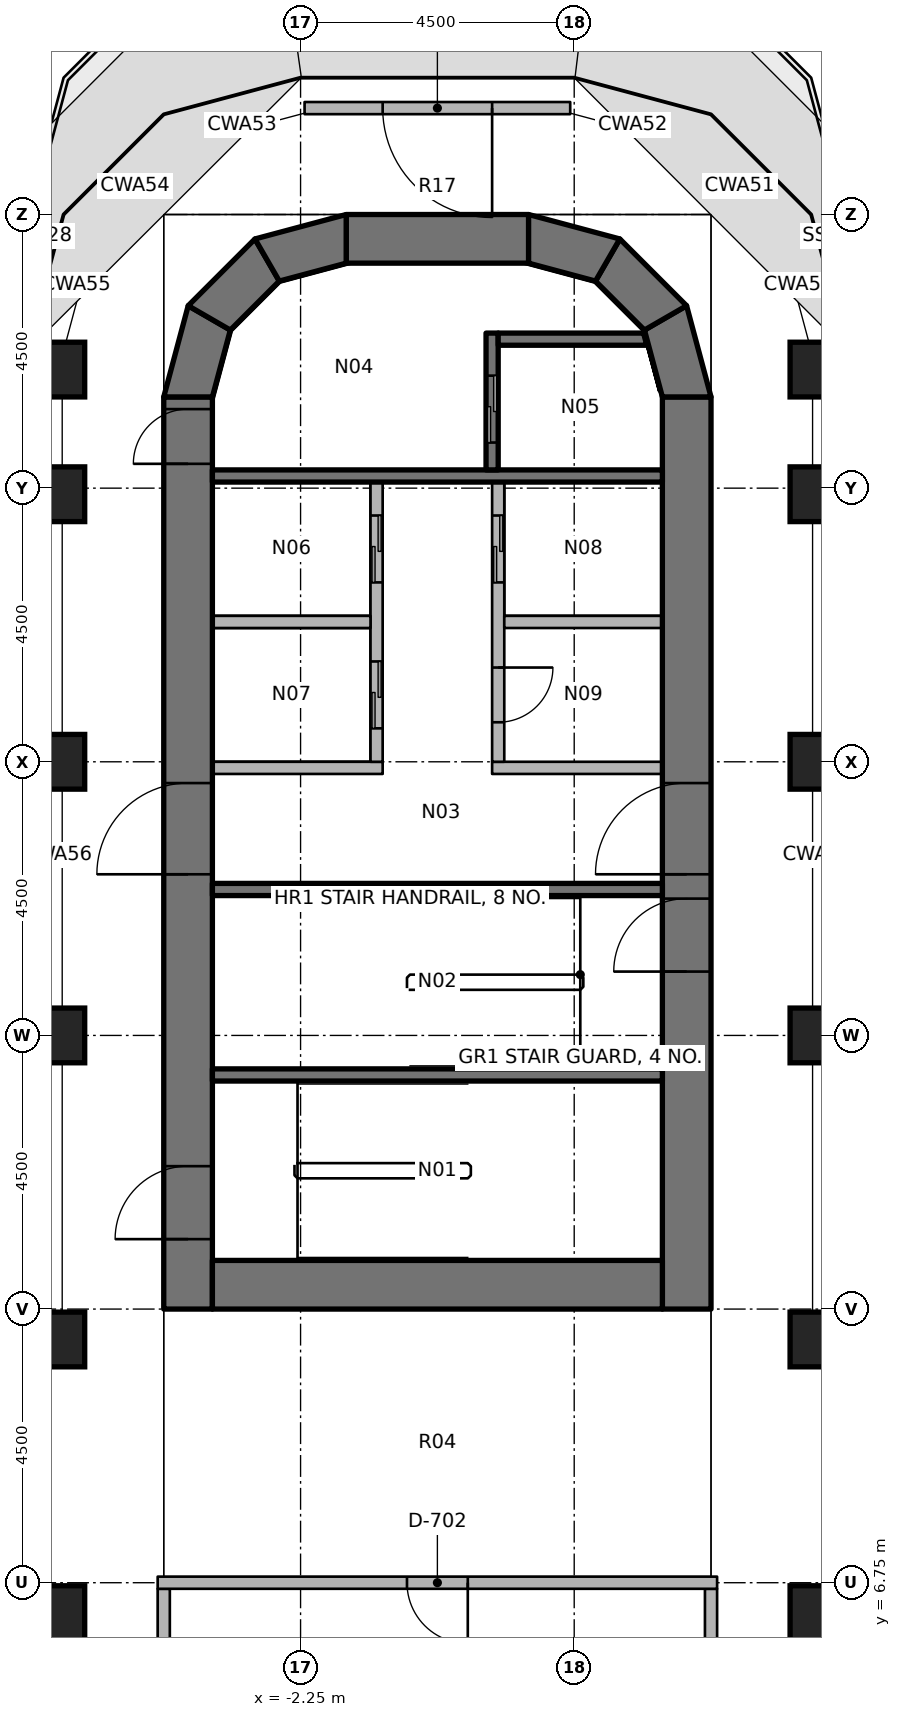
"""IFC4 building model, lengths in metres.
Left out: names, types, materials, properties, quantities, classifications, styles, units other than length and angle.
Written with IfcOpenShell. Run it as: python <this file> out.ifc"""

import sys

from ifc_helpers import new_model, si_unit, direction, frame, frame_2d, origin, origin_2d, place, context, subcontext, project, spatial, polyline, rectangle, outline, extrude, element, fill, save


model = new_model("IFC4")
c1 = context("Model", 3, precision=1e-05, world=origin(), true_north=direction((0.0, 1.0)))
c2 = subcontext(c1, "Body", "Model", "MODEL_VIEW")
j1 = project(units=[si_unit("LENGTHUNIT", "METRE"), si_unit("PLANEANGLEUNIT", "RADIAN")], contexts=[c1])
p1 = place(None, origin())
s1 = spatial("IfcSite", under=j1, at=p1, CompositionType="ELEMENT")
p2 = place(p1, origin())
s2 = spatial("IfcBuilding", under=s1, at=p2, CompositionType="ELEMENT")
p3 = place(p2, frame((0.0, 0.0, 94.2)))
s3 = spatial("IfcBuildingStorey", under=s2, at=p3, CompositionType="ELEMENT", Elevation=94.2)
for number, where, z_axis, x_axis in (
    (1, (-6.25, 6.25, 0.0), (0.0, 0.0, 1.0), (1.0, 0.0, 0.0)),
    (2, (-6.25, 10.75, 0.0), (0.0, 0.0, 1.0), (1.0, 0.0, 0.0)),
    (3, (-6.25, 15.75, 0.0), (0.0, 0.0, 1.0), (1.0, 0.0, 0.0)),
    (4, (-6.25, 20.25, 0.0), (0.0, 0.0, 1.0), (1.0, 0.0, 0.0)),
    (5, (-6.25, 24.65, 0.0), (0.0, 0.0, 1.0), (1.0, 0.0, 0.0)),
    (6, (-6.25, 26.7, 0.0), (0.0, 0.0, 1.0), (1.0, 0.0, 0.0)),
    (7, (6.25, 6.25, 0.0), (0.0, 0.0, 1.0), (1.0, 0.0, 0.0)),
    (8, (6.25, 10.75, 0.0), (0.0, 0.0, 1.0), (1.0, 0.0, 0.0)),
    (9, (6.25, 15.75, 0.0), (0.0, 0.0, 1.0), (1.0, 0.0, 0.0)),
    (10, (6.25, 20.25, 0.0), (0.0, 0.0, 1.0), (1.0, 0.0, 0.0)),
    (11, (6.25, 24.65, 0.0), (0.0, 0.0, 1.0), (1.0, 0.0, 0.0)),
    (12, (6.25, 26.7, 0.0), (0.0, 0.0, 1.0), (1.0, 0.0, 0.0)),
):
    element("IfcColumn", number, at=place(p3, frame(where, z_axis=z_axis, x_axis=x_axis)), inside=s3, PredefinedType="COLUMN", context=c2, shape_type="SweptSolid", body=[
        extrude(rectangle(XDim=0.9, YDim=0.9, at=origin_2d()), origin(), (0.0, 0.0, 1.0), 3.65),
    ])
p4 = place(p3, frame((-4.1, 11.25, 0.0), z_axis=(0.0, 0.0, 1.0), x_axis=(0.0, 1.0, 0.0)))
e13 = element("IfcWall", 13, at=p4, inside=s3, PredefinedType="SHEAR", context=c2, shape_type="SweptSolid", body=[
    extrude(rectangle(XDim=15.0, YDim=0.8, at=frame_2d((7.5, 0.0))), origin(), (0.0, 0.0, 1.0), 3.8),
])
p5 = place(p4, frame((7.15, 0.0, 0.0)))
e14 = element("IfcOpeningElement", 14, at=p5, cuts=e13, PredefinedType="OPENING", context=c2, shape_type="SweptSolid", body=[
    extrude(rectangle(XDim=1.5, YDim=2.3, at=frame_2d((0.75, 1.15))), frame((0.0, 0.41, 0.0), z_axis=(0.0, -1.0, 0.0), x_axis=(1.0, 0.0, 0.0)), (0.0, 0.0, 1.0), 0.82),
])
p6 = place(p4, frame((13.9, 0.0, 0.0)))
e15 = element("IfcOpeningElement", 15, at=p6, cuts=e13, PredefinedType="OPENING", context=c2, shape_type="SweptSolid", body=[
    extrude(rectangle(XDim=0.9, YDim=2.1, at=frame_2d((0.45, 1.05))), frame((0.0, 0.41, 0.0), z_axis=(0.0, -1.0, 0.0), x_axis=(1.0, 0.0, 0.0)), (0.0, 0.0, 1.0), 0.82),
])
p7 = place(p4, frame((1.15, 0.0, 0.0)))
e16 = element("IfcOpeningElement", 16, at=p7, cuts=e13, PredefinedType="OPENING", context=c2, shape_type="SweptSolid", body=[
    extrude(rectangle(XDim=1.2, YDim=2.1, at=frame_2d((0.6, 1.05))), frame((0.0, 0.41, 0.0), z_axis=(0.0, -1.0, 0.0), x_axis=(1.0, 0.0, 0.0)), (0.0, 0.0, 1.0), 0.82),
])
p8 = place(p3, frame((4.1, 11.25, 0.0), z_axis=(0.0, 0.0, 1.0), x_axis=(0.0, 1.0, 0.0)))
e17 = element("IfcWall", 17, at=p8, inside=s3, PredefinedType="SHEAR", context=c2, shape_type="SweptSolid", body=[
    extrude(rectangle(XDim=15.0, YDim=0.8, at=frame_2d((7.5, 0.0))), origin(), (0.0, 0.0, 1.0), 3.8),
])
p9 = place(p8, frame((7.15, 0.0, 0.0)))
e18 = element("IfcOpeningElement", 18, at=p9, cuts=e17, PredefinedType="OPENING", context=c2, shape_type="SweptSolid", body=[
    extrude(rectangle(XDim=1.5, YDim=2.3, at=frame_2d((0.75, 1.15))), frame((0.0, 0.41, 0.0), z_axis=(0.0, -1.0, 0.0), x_axis=(1.0, 0.0, 0.0)), (0.0, 0.0, 1.0), 0.82),
])
p10 = place(p8, frame((5.55, 0.0, 0.0)))
e19 = element("IfcOpeningElement", 19, at=p10, cuts=e17, PredefinedType="OPENING", context=c2, shape_type="SweptSolid", body=[
    extrude(rectangle(XDim=1.2, YDim=2.1, at=frame_2d((0.6, 1.05))), frame((0.0, 0.41, 0.0), z_axis=(0.0, -1.0, 0.0), x_axis=(1.0, 0.0, 0.0)), (0.0, 0.0, 1.0), 0.82),
])
p11 = place(p3, frame((-3.7, 11.65, 0.0), z_axis=(0.0, 0.0, 1.0), x_axis=(1.0, 0.0, 0.0)))
e20 = element("IfcWall", 20, at=p11, inside=s3, PredefinedType="SHEAR", context=c2, shape_type="SweptSolid", body=[
    extrude(rectangle(XDim=7.4, YDim=0.8, at=frame_2d((3.7, 0.0))), origin(), (0.0, 0.0, 1.0), 3.8),
])
p12 = place(p3, frame((-1.5, 28.85, 0.0), z_axis=(0.0, 0.0, 1.0), x_axis=(1.0, 0.0, 0.0)))
e21 = element("IfcWall", 21, at=p12, inside=s3, PredefinedType="SHEAR", context=c2, shape_type="SweptSolid", body=[
    extrude(rectangle(XDim=3.0, YDim=0.8, at=frame_2d((1.5, 0.0))), origin(), (0.0, 0.0, 1.0), 3.8),
])
p13 = place(p3, origin())
e22 = element("IfcWall", 22, at=p13, inside=s3, PredefinedType="SHEAR", context=c2, shape_type="SweptSolid", body=[
    extrude(outline(polyline([(-4.5, 26.25), (-4.098, 27.75), (-3.405, 27.35), (-3.7, 26.25), (-4.5, 26.25)])), origin(), (0.0, 0.0, 1.0), 3.8),
])
p14 = place(p3, origin())
e23 = element("IfcWall", 23, at=p14, inside=s3, PredefinedType="SHEAR", context=c2, shape_type="SweptSolid", body=[
    extrude(outline(polyline([(-4.098, 27.75), (-3.0, 28.848), (-2.6, 28.155), (-3.405, 27.35), (-4.098, 27.75)])), origin(), (0.0, 0.0, 1.0), 3.8),
])
p15 = place(p3, origin())
e24 = element("IfcWall", 24, at=p15, inside=s3, PredefinedType="SHEAR", context=c2, shape_type="SweptSolid", body=[
    extrude(outline(polyline([(-3.0, 28.848), (-1.5, 29.25), (-1.5, 28.45), (-2.6, 28.155), (-3.0, 28.848)])), origin(), (0.0, 0.0, 1.0), 3.8),
])
p16 = place(p3, origin())
e25 = element("IfcWall", 25, at=p16, inside=s3, PredefinedType="SHEAR", context=c2, shape_type="SweptSolid", body=[
    extrude(outline(polyline([(4.5, 26.25), (4.098, 27.75), (3.405, 27.35), (3.7, 26.25), (4.5, 26.25)])), origin(), (0.0, 0.0, 1.0), 3.8),
])
p17 = place(p3, origin())
e26 = element("IfcWall", 26, at=p17, inside=s3, PredefinedType="SHEAR", context=c2, shape_type="SweptSolid", body=[
    extrude(outline(polyline([(4.098, 27.75), (3.0, 28.848), (2.6, 28.155), (3.405, 27.35), (4.098, 27.75)])), origin(), (0.0, 0.0, 1.0), 3.8),
])
p18 = place(p3, origin())
e27 = element("IfcWall", 27, at=p18, inside=s3, PredefinedType="SHEAR", context=c2, shape_type="SweptSolid", body=[
    extrude(outline(polyline([(3.0, 28.848), (1.5, 29.25), (1.5, 28.45), (2.6, 28.155), (3.0, 28.848)])), origin(), (0.0, 0.0, 1.0), 3.8),
])
p19 = place(p3, frame((2.184, 31.0, 0.0), z_axis=(0.0, 0.0, 1.0), x_axis=(-1.0, 0.0, 0.0)))
e28 = element("IfcWall", 28, at=p19, inside=s3, PredefinedType="SOLIDWALL", context=c2, shape_type="SweptSolid", body=[
    extrude(rectangle(XDim=4.368, YDim=0.2, at=frame_2d((2.184, 0.0))), origin(), (0.0, 0.0, 1.0), 2.75),
])
p20 = place(p19, frame((1.284, 0.0, 0.0)))
e29 = element("IfcOpeningElement", 29, at=p20, cuts=e28, PredefinedType="OPENING", context=c2, shape_type="SweptSolid", body=[
    extrude(rectangle(XDim=1.8, YDim=2.4, at=frame_2d((0.9, 1.2))), frame((0.0, 0.11, 0.0), z_axis=(0.0, -1.0, 0.0), x_axis=(1.0, 0.0, 0.0)), (0.0, 0.0, 1.0), 0.22),
])
p21 = place(p3, frame((-3.7, 24.95, 0.0), z_axis=(0.0, 0.0, 1.0), x_axis=(1.0, 0.0, 0.0)))
e30 = element("IfcWall", 30, at=p21, inside=s3, PredefinedType="SHEAR", context=c2, shape_type="SweptSolid", body=[
    extrude(rectangle(XDim=7.4, YDim=0.2, at=frame_2d((3.7, 0.0))), origin(), (0.0, 0.0, 1.0), 3.65),
])
p22 = place(p3, frame((0.9, 27.3, 0.0), z_axis=(0.0, 0.0, 1.0), x_axis=(0.0, -1.0, 0.0)))
e31 = element("IfcWall", 31, at=p22, inside=s3, PredefinedType="SHEAR", context=c2, shape_type="SweptSolid", body=[
    extrude(rectangle(XDim=2.25, YDim=0.2, at=frame_2d((1.125, 0.0))), origin(), (0.0, 0.0, 1.0), 3.65),
])
p23 = place(p22, frame((0.7, 0.0, 0.0)))
e32 = element("IfcOpeningElement", 32, at=p23, cuts=e31, PredefinedType="OPENING", context=c2, shape_type="SweptSolid", body=[
    extrude(rectangle(XDim=1.1, YDim=2.3, at=frame_2d((0.55, 1.15))), frame((0.0, 0.11, 0.0), z_axis=(0.0, -1.0, 0.0), x_axis=(1.0, 0.0, 0.0)), (0.0, 0.0, 1.0), 0.22),
])
p24 = place(p3, origin())
e33 = element("IfcWall", 33, at=p24, inside=s3, PredefinedType="SHEAR", context=c2, shape_type="SweptSolid", body=[
    extrude(outline(polyline([(1.0, 27.1), (3.444, 27.1), (3.39, 27.3), (1.0, 27.3), (1.0, 27.1)])), origin(), (0.0, 0.0, 1.0), 3.65),
])
for number, where, z_axis, x_axis in (
    (34, (-3.7, 18.15, 0.0), (0.0, 0.0, 1.0), (1.0, 0.0, 0.0)),
    (35, (-3.7, 15.1, 0.0), (0.0, 0.0, 1.0), (1.0, 0.0, 0.0)),
):
    element("IfcWall", number, at=place(p3, frame(where, z_axis=z_axis, x_axis=x_axis)), inside=s3, PredefinedType="SHEAR", context=c2, shape_type="SweptSolid", body=[
        extrude(rectangle(XDim=7.4, YDim=0.2, at=frame_2d((3.7, 0.0))), origin(), (0.0, 0.0, 1.0), 3.65),
    ])
p25 = place(p3, frame((-3.7, 20.15, 0.0), z_axis=(0.0, 0.0, 1.0), x_axis=(1.0, 0.0, 0.0)))
e36 = element("IfcWall", 36, at=p25, inside=s3, PredefinedType="PARTITIONING", context=c2, shape_type="SweptSolid", body=[
    extrude(rectangle(XDim=2.8, YDim=0.2, at=frame_2d((1.4, 0.0))), origin(), (0.0, 0.0, 1.0), 3.65),
])
p26 = place(p3, frame((-1.0, 24.85, 0.0), z_axis=(0.0, 0.0, 1.0), x_axis=(0.0, -1.0, 0.0)))
e37 = element("IfcWall", 37, at=p26, inside=s3, PredefinedType="PARTITIONING", context=c2, shape_type="SweptSolid", body=[
    extrude(rectangle(XDim=4.6, YDim=0.2, at=frame_2d((2.3, 0.0))), origin(), (0.0, 0.0, 1.0), 3.65),
])
p27 = place(p26, frame((0.55, 0.0, 0.0)))
e38 = element("IfcOpeningElement", 38, at=p27, cuts=e37, PredefinedType="OPENING", context=c2, shape_type="SweptSolid", body=[
    extrude(rectangle(XDim=1.1, YDim=2.3, at=frame_2d((0.55, 1.15))), frame((0.0, 0.11, 0.0), z_axis=(0.0, -1.0, 0.0), x_axis=(1.0, 0.0, 0.0)), (0.0, 0.0, 1.0), 0.22),
])
p28 = place(p26, frame((2.95, 0.0, 0.0)))
e39 = element("IfcOpeningElement", 39, at=p28, cuts=e37, PredefinedType="OPENING", context=c2, shape_type="SweptSolid", body=[
    extrude(rectangle(XDim=1.1, YDim=2.3, at=frame_2d((0.55, 1.15))), frame((0.0, 0.11, 0.0), z_axis=(0.0, -1.0, 0.0), x_axis=(1.0, 0.0, 0.0)), (0.0, 0.0, 1.0), 0.22),
])
p29 = place(p3, frame((0.9, 20.15, 0.0), z_axis=(0.0, 0.0, 1.0), x_axis=(1.0, 0.0, 0.0)))
e40 = element("IfcWall", 40, at=p29, inside=s3, PredefinedType="PARTITIONING", context=c2, shape_type="SweptSolid", body=[
    extrude(rectangle(XDim=2.8, YDim=0.2, at=frame_2d((1.4, 0.0))), origin(), (0.0, 0.0, 1.0), 3.65),
])
p30 = place(p3, frame((1.0, 24.85, 0.0), z_axis=(0.0, 0.0, 1.0), x_axis=(0.0, -1.0, 0.0)))
e41 = element("IfcWall", 41, at=p30, inside=s3, PredefinedType="PARTITIONING", context=c2, shape_type="SweptSolid", body=[
    extrude(rectangle(XDim=4.6, YDim=0.2, at=frame_2d((2.3, 0.0))), origin(), (0.0, 0.0, 1.0), 3.65),
])
p31 = place(p30, frame((0.55, 0.0, 0.0)))
e42 = element("IfcOpeningElement", 42, at=p31, cuts=e41, PredefinedType="OPENING", context=c2, shape_type="SweptSolid", body=[
    extrude(rectangle(XDim=1.1, YDim=2.3, at=frame_2d((0.55, 1.15))), frame((0.0, 0.11, 0.0), z_axis=(0.0, -1.0, 0.0), x_axis=(1.0, 0.0, 0.0)), (0.0, 0.0, 1.0), 0.22),
])
p32 = place(p30, frame((3.05, 0.0, 0.0)))
e43 = element("IfcOpeningElement", 43, at=p32, cuts=e41, PredefinedType="OPENING", context=c2, shape_type="SweptSolid", body=[
    extrude(rectangle(XDim=0.9, YDim=2.1, at=frame_2d((0.45, 1.05))), frame((0.0, 0.11, 0.0), z_axis=(0.0, -1.0, 0.0), x_axis=(1.0, 0.0, 0.0)), (0.0, 0.0, 1.0), 0.22),
])
for number, where, z_axis, x_axis in (
    (44, (-3.7, 22.55, 0.0), (0.0, 0.0, 1.0), (1.0, 0.0, 0.0)),
    (45, (1.1, 22.55, 0.0), (0.0, 0.0, 1.0), (1.0, 0.0, 0.0)),
):
    element("IfcWall", number, at=place(p3, frame(where, z_axis=z_axis, x_axis=x_axis)), inside=s3, PredefinedType="PARTITIONING", context=c2, shape_type="SweptSolid", body=[
        extrude(rectangle(XDim=2.6, YDim=0.2, at=frame_2d((1.3, 0.0))), origin(), (0.0, 0.0, 1.0), 3.65),
    ])
for number, where, z_axis, x_axis in (
    (46, (-4.5, 2.35, 0.0), (0.0, 0.0, 1.0), (0.0, 1.0, 0.0)),
    (47, (4.5, 2.35, 0.0), (0.0, 0.0, 1.0), (0.0, 1.0, 0.0)),
):
    element("IfcWall", number, at=place(p3, frame(where, z_axis=z_axis, x_axis=x_axis)), inside=s3, PredefinedType="PARTITIONING", context=c2, shape_type="SweptSolid", body=[
        extrude(rectangle(XDim=4.3, YDim=0.2, at=frame_2d((2.15, 0.0))), origin(), (0.0, 0.0, 1.0), 2.738),
    ])
p33 = place(p3, frame((4.6, 6.75, 0.0), z_axis=(0.0, 0.0, 1.0), x_axis=(-1.0, 0.0, 0.0)))
e48 = element("IfcWall", 48, at=p33, inside=s3, PredefinedType="PARTITIONING", context=c2, shape_type="SweptSolid", body=[
    extrude(rectangle(XDim=9.2, YDim=0.2, at=frame_2d((4.6, 0.0))), origin(), (0.0, 0.0, 1.0), 2.738),
])
p34 = place(p33, frame((4.1, 0.0, 0.0)))
e49 = element("IfcOpeningElement", 49, at=p34, cuts=e48, PredefinedType="OPENING", context=c2, shape_type="SweptSolid", body=[
    extrude(rectangle(XDim=1.0, YDim=2.1, at=frame_2d((0.5, 1.05))), frame((0.0, 0.11, 0.0), z_axis=(0.0, -1.0, 0.0), x_axis=(1.0, 0.0, 0.0)), (0.0, 0.0, 1.0), 0.22),
])
p35 = place(p20, origin())
e50 = element("IfcDoor", 50, at=p35, inside=s3, OperationType="SINGLE_SWING_LEFT", PredefinedType="DOOR", context=c2, shape_type="SweptSolid", body=[
    extrude(rectangle(XDim=1.8, YDim=2.4, at=frame_2d((0.9, 1.2))), frame((0.0, 0.025, 0.0), z_axis=(0.0, -1.0, 0.0), x_axis=(1.0, 0.0, 0.0)), (0.0, 0.0, 1.0), 0.05),
])
fill(e29, e50)
p36 = place(p5, origin())
e51 = element("IfcDoor", 51, at=p36, inside=s3, OperationType="DOUBLE_DOOR_SINGLE_SWING", PredefinedType="DOOR", context=c2, shape_type="SweptSolid", body=[
    extrude(rectangle(XDim=1.5, YDim=2.3, at=frame_2d((0.75, 1.15))), frame((0.0, 0.025, 0.0), z_axis=(0.0, -1.0, 0.0), x_axis=(1.0, 0.0, 0.0)), (0.0, 0.0, 1.0), 0.05),
])
fill(e14, e51)
p37 = place(p9, origin())
e52 = element("IfcDoor", 52, at=p37, inside=s3, OperationType="DOUBLE_DOOR_SINGLE_SWING", PredefinedType="DOOR", context=c2, shape_type="SweptSolid", body=[
    extrude(rectangle(XDim=1.5, YDim=2.3, at=frame_2d((0.75, 1.15))), frame((0.0, 0.025, 0.0), z_axis=(0.0, -1.0, 0.0), x_axis=(1.0, 0.0, 0.0)), (0.0, 0.0, 1.0), 0.05),
])
fill(e18, e52)
p38 = place(p6, origin())
e53 = element("IfcDoor", 53, at=p38, inside=s3, OperationType="SINGLE_SWING_RIGHT", PredefinedType="DOOR", context=c2, shape_type="SweptSolid", body=[
    extrude(rectangle(XDim=0.9, YDim=2.1, at=frame_2d((0.45, 1.05))), frame((0.0, 0.025, 0.0), z_axis=(0.0, -1.0, 0.0), x_axis=(1.0, 0.0, 0.0)), (0.0, 0.0, 1.0), 0.05),
])
fill(e15, e53)
p39 = place(p10, origin())
e54 = element("IfcDoor", 54, at=p39, inside=s3, OperationType="SINGLE_SWING_LEFT", PredefinedType="DOOR", context=c2, shape_type="SweptSolid", body=[
    extrude(rectangle(XDim=1.2, YDim=2.1, at=frame_2d((0.6, 1.05))), frame((0.0, 0.025, 0.0), z_axis=(0.0, -1.0, 0.0), x_axis=(1.0, 0.0, 0.0)), (0.0, 0.0, 1.0), 0.05),
])
fill(e19, e54)
p40 = place(p7, origin())
e55 = element("IfcDoor", 55, at=p40, inside=s3, OperationType="SINGLE_SWING_RIGHT", PredefinedType="DOOR", context=c2, shape_type="SweptSolid", body=[
    extrude(rectangle(XDim=1.2, YDim=2.1, at=frame_2d((0.6, 1.05))), frame((0.0, 0.025, 0.0), z_axis=(0.0, -1.0, 0.0), x_axis=(1.0, 0.0, 0.0)), (0.0, 0.0, 1.0), 0.05),
])
fill(e16, e55)
p41 = place(p23, origin())
e56 = element("IfcDoor", 56, at=p41, inside=s3, OperationType="DOUBLE_DOOR_SLIDING", PredefinedType="DOOR", context=c2, shape_type="SweptSolid", body=[
    extrude(rectangle(XDim=1.1, YDim=2.3, at=frame_2d((0.55, 1.15))), frame((0.0, 0.025, 0.0), z_axis=(0.0, -1.0, 0.0), x_axis=(1.0, 0.0, 0.0)), (0.0, 0.0, 1.0), 0.05),
])
fill(e32, e56)
p42 = place(p27, origin())
e57 = element("IfcDoor", 57, at=p42, inside=s3, OperationType="DOUBLE_DOOR_SLIDING", PredefinedType="DOOR", context=c2, shape_type="SweptSolid", body=[
    extrude(rectangle(XDim=1.1, YDim=2.3, at=frame_2d((0.55, 1.15))), frame((0.0, 0.025, 0.0), z_axis=(0.0, -1.0, 0.0), x_axis=(1.0, 0.0, 0.0)), (0.0, 0.0, 1.0), 0.05),
])
fill(e38, e57)
p43 = place(p28, origin())
e58 = element("IfcDoor", 58, at=p43, inside=s3, OperationType="DOUBLE_DOOR_SLIDING", PredefinedType="DOOR", context=c2, shape_type="SweptSolid", body=[
    extrude(rectangle(XDim=1.1, YDim=2.3, at=frame_2d((0.55, 1.15))), frame((0.0, 0.025, 0.0), z_axis=(0.0, -1.0, 0.0), x_axis=(1.0, 0.0, 0.0)), (0.0, 0.0, 1.0), 0.05),
])
fill(e39, e58)
p44 = place(p31, origin())
e59 = element("IfcDoor", 59, at=p44, inside=s3, OperationType="DOUBLE_DOOR_SLIDING", PredefinedType="DOOR", context=c2, shape_type="SweptSolid", body=[
    extrude(rectangle(XDim=1.1, YDim=2.3, at=frame_2d((0.55, 1.15))), frame((0.0, 0.025, 0.0), z_axis=(0.0, -1.0, 0.0), x_axis=(1.0, 0.0, 0.0)), (0.0, 0.0, 1.0), 0.05),
])
fill(e42, e59)
p45 = place(p32, origin())
e60 = element("IfcDoor", 60, at=p45, inside=s3, OperationType="SINGLE_SWING_RIGHT", PredefinedType="DOOR", context=c2, shape_type="SweptSolid", body=[
    extrude(rectangle(XDim=0.9, YDim=2.1, at=frame_2d((0.45, 1.05))), frame((0.0, 0.025, 0.0), z_axis=(0.0, -1.0, 0.0), x_axis=(1.0, 0.0, 0.0)), (0.0, 0.0, 1.0), 0.05),
])
fill(e43, e60)
p46 = place(p34, origin())
e61 = element("IfcDoor", 61, at=p46, inside=s3, OperationType="SINGLE_SWING_RIGHT", PredefinedType="DOOR", context=c2, shape_type="SweptSolid", body=[
    extrude(rectangle(XDim=1.0, YDim=2.1, at=frame_2d((0.5, 1.05))), frame((0.0, 0.025, 0.0), z_axis=(0.0, -1.0, 0.0), x_axis=(1.0, 0.0, 0.0)), (0.0, 0.0, 1.0), 0.05),
])
fill(e49, e61)
save(model, sys.argv[1])
